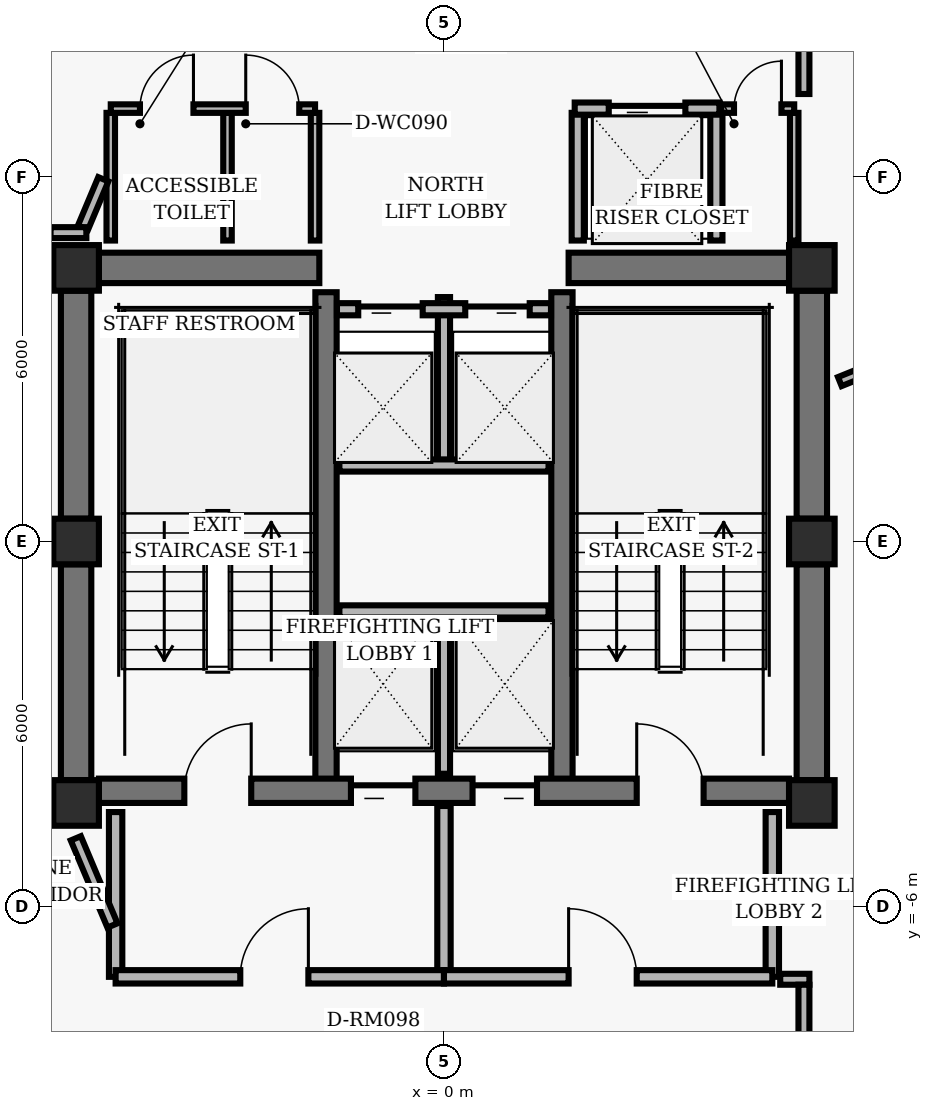
"""IFC4 building model, lengths in metres.
Left out: names, types, materials, properties, quantities, classifications, styles, units other than length and angle.
Written with IfcOpenShell. Run it as: python <this file> out.ifc"""

import sys

from ifc_helpers import new_model, si_unit, direction, frame, frame_2d, origin, origin_2d, place, context, subcontext, project, spatial, rectangle, hollow_rectangle, extrude, element, fill, save


model = new_model("IFC4")
c1 = context("Model", 3, precision=1e-05, world=origin(), true_north=direction((0.0, 1.0)))
c2 = subcontext(c1, "Body", "Model", "MODEL_VIEW")
j1 = project(units=[si_unit("LENGTHUNIT", "METRE"), si_unit("PLANEANGLEUNIT", "RADIAN")], contexts=[c1])
p1 = place(None, origin())
s1 = spatial("IfcSite", under=j1, at=p1, CompositionType="ELEMENT")
p2 = place(p1, origin())
s2 = spatial("IfcBuilding", under=s1, at=p2, CompositionType="ELEMENT")
p3 = place(p2, frame((0.0, 0.0, 190.56)))
s3 = spatial("IfcBuildingStorey", under=s2, at=p3, CompositionType="ELEMENT", Elevation=190.56)
for number, where, z_axis, x_axis in (
    (1, (-6.05, 4.5, 0.0), (0.0, 0.0, 1.0), (1.0, 0.0, 0.0)),
    (2, (6.05, 4.5, 0.0), (0.0, 0.0, 1.0), (1.0, 0.0, 0.0)),
    (3, (-6.05, 0.0, 0.0), (0.0, 0.0, 1.0), (1.0, 0.0, 0.0)),
    (4, (6.05, 0.0, 0.0), (0.0, 0.0, 1.0), (1.0, 0.0, 0.0)),
    (5, (-6.05, -4.3, 0.0), (0.0, 0.0, 1.0), (1.0, 0.0, 0.0)),
    (6, (6.05, -4.3, 0.0), (0.0, 0.0, 1.0), (1.0, 0.0, 0.0)),
):
    element("IfcColumn", number, at=place(p3, frame(where, z_axis=z_axis, x_axis=x_axis)), inside=s3, PredefinedType="COLUMN", context=c2, shape_type="SweptSolid", body=[
        extrude(hollow_rectangle(XDim=0.75, YDim=0.75, WallThickness=0.05, InnerFilletRadius=0.02, OuterFilletRadius=0.04, at=origin_2d()), origin(), (0.0, 0.0, 1.0), 3.04),
    ])
p4 = place(p3, frame((-6.05, 0.375, 0.0), z_axis=(0.0, 0.0, 1.0), x_axis=(0.0, 1.0, 0.0)))
e7 = element("IfcWall", 7, at=p4, inside=s3, PredefinedType="SHEAR", context=c2, shape_type="SweptSolid", body=[
    extrude(rectangle(XDim=3.75, YDim=0.5, at=frame_2d((1.875, 0.0))), origin(), (0.0, 0.0, 1.0), 2.618),
])
p5 = place(p3, frame((-6.05, -3.925, 0.0), z_axis=(0.0, 0.0, 1.0), x_axis=(0.0, 1.0, 0.0)))
e8 = element("IfcWall", 8, at=p5, inside=s3, PredefinedType="SHEAR", context=c2, shape_type="SweptSolid", body=[
    extrude(rectangle(XDim=3.55, YDim=0.5, at=frame_2d((1.775, 0.0))), origin(), (0.0, 0.0, 1.0), 2.618),
])
p6 = place(p3, frame((6.05, 0.375, 0.0), z_axis=(0.0, 0.0, 1.0), x_axis=(0.0, 1.0, 0.0)))
e9 = element("IfcWall", 9, at=p6, inside=s3, PredefinedType="SHEAR", context=c2, shape_type="SweptSolid", body=[
    extrude(rectangle(XDim=3.75, YDim=0.5, at=frame_2d((1.875, 0.0))), origin(), (0.0, 0.0, 1.0), 2.618),
])
p7 = place(p3, frame((6.05, -3.925, 0.0), z_axis=(0.0, 0.0, 1.0), x_axis=(0.0, 1.0, 0.0)))
e10 = element("IfcWall", 10, at=p7, inside=s3, PredefinedType="SHEAR", context=c2, shape_type="SweptSolid", body=[
    extrude(rectangle(XDim=3.55, YDim=0.5, at=frame_2d((1.775, 0.0))), origin(), (0.0, 0.0, 1.0), 2.618),
])
for number, where, z_axis, x_axis in (
    (11, (-1.94, -4.1, 0.0), (0.0, 0.0, 1.0), (0.0, 1.0, 0.0)),
    (12, (1.94, -4.1, 0.0), (0.0, 0.0, 1.0), (0.0, 1.0, 0.0)),
):
    element("IfcWall", number, at=place(p3, frame(where, z_axis=z_axis, x_axis=x_axis)), inside=s3, PredefinedType="SHEAR", context=c2, shape_type="SweptSolid", body=[
        extrude(rectangle(XDim=8.2, YDim=0.35, at=frame_2d((4.1, 0.0))), origin(), (0.0, 0.0, 1.0), 2.618),
    ])
p8 = place(p3, frame((-5.675, -4.1, 0.0), z_axis=(0.0, 0.0, 1.0), x_axis=(1.0, 0.0, 0.0)))
e13 = element("IfcWall", 13, at=p8, inside=s3, PredefinedType="SHEAR", context=c2, shape_type="SweptSolid", body=[
    extrude(rectangle(XDim=11.35, YDim=0.4, at=frame_2d((5.675, 0.0))), origin(), (0.0, 0.0, 1.0), 2.618),
])
p9 = place(p8, frame((1.405, 0.0, 0.0)))
e14 = element("IfcOpeningElement", 14, at=p9, cuts=e13, PredefinedType="OPENING", context=c2, shape_type="SweptSolid", body=[
    extrude(rectangle(XDim=1.1, YDim=2.04, at=frame_2d((0.55, 1.02))), frame((0.0, 0.21, 0.0), z_axis=(0.0, -1.0, 0.0), x_axis=(1.0, 0.0, 0.0)), (0.0, 0.0, 1.0), 0.42),
])
p10 = place(p8, frame((8.845, 0.0, 0.0)))
e15 = element("IfcOpeningElement", 15, at=p10, cuts=e13, PredefinedType="OPENING", context=c2, shape_type="SweptSolid", body=[
    extrude(rectangle(XDim=1.1, YDim=2.04, at=frame_2d((0.55, 1.02))), frame((0.0, 0.21, 0.0), z_axis=(0.0, -1.0, 0.0), x_axis=(1.0, 0.0, 0.0)), (0.0, 0.0, 1.0), 0.42),
])
p11 = place(p8, frame((4.145, 0.0, 0.0)))
e16 = element("IfcOpeningElement", 16, at=p11, cuts=e13, PredefinedType="OPENING", context=c2, shape_type="SweptSolid", body=[
    extrude(rectangle(XDim=1.06, YDim=2.04, at=frame_2d((0.53, 1.02))), frame((0.0, 0.21, 0.0), z_axis=(0.0, -1.0, 0.0), x_axis=(1.0, 0.0, 0.0)), (0.0, 0.0, 1.0), 0.42),
])
p12 = place(p8, frame((6.145, 0.0, 0.0)))
e17 = element("IfcOpeningElement", 17, at=p12, cuts=e13, PredefinedType="OPENING", context=c2, shape_type="SweptSolid", body=[
    extrude(rectangle(XDim=1.06, YDim=2.04, at=frame_2d((0.53, 1.02))), frame((0.0, 0.21, 0.0), z_axis=(0.0, -1.0, 0.0), x_axis=(1.0, 0.0, 0.0)), (0.0, 0.0, 1.0), 0.42),
])
for number, where, z_axis, x_axis in (
    (18, (-5.675, 4.5, 0.0), (0.0, 0.0, 1.0), (1.0, 0.0, 0.0)),
    (19, (2.05, 4.5, 0.0), (0.0, 0.0, 1.0), (1.0, 0.0, 0.0)),
):
    element("IfcWall", number, at=place(p3, frame(where, z_axis=z_axis, x_axis=x_axis)), inside=s3, PredefinedType="SHEAR", context=c2, shape_type="SweptSolid", body=[
        extrude(rectangle(XDim=3.625, YDim=0.5, at=frame_2d((1.812, 0.0))), origin(), (0.0, 0.0, 1.0), 2.618),
    ])
p13 = place(p3, frame((0.0, -3.82, 0.0), z_axis=(0.0, 0.0, 1.0), x_axis=(0.0, 1.0, 0.0)))
e20 = element("IfcWall", 20, at=p13, inside=s3, PredefinedType="PARTITIONING", context=c2, shape_type="SweptSolid", body=[
    extrude(rectangle(XDim=2.67, YDim=0.2, at=frame_2d((1.335, 0.0))), origin(), (0.0, 0.0, 1.0), 2.593),
])
p14 = place(p3, frame((-1.72, -1.15, 0.0), z_axis=(0.0, 0.0, 1.0), x_axis=(1.0, 0.0, 0.0)))
e21 = element("IfcWall", 21, at=p14, inside=s3, PredefinedType="PARTITIONING", context=c2, shape_type="SweptSolid", body=[
    extrude(rectangle(XDim=3.44, YDim=0.2, at=frame_2d((1.72, 0.0))), origin(), (0.0, 0.0, 1.0), 2.593),
])
for number, where, z_axis, x_axis in (
    (22, (-5.4, -7.16, 0.0), (0.0, 0.0, 1.0), (0.0, 1.0, 0.0)),
    (23, (5.4, -7.16, 0.0), (0.0, 0.0, 1.0), (0.0, 1.0, 0.0)),
):
    element("IfcWall", number, at=place(p3, frame(where, z_axis=z_axis, x_axis=x_axis)), inside=s3, PredefinedType="PARTITIONING", context=c2, shape_type="SweptSolid", body=[
        extrude(rectangle(XDim=2.71, YDim=0.22, at=frame_2d((1.355, 0.0))), origin(), (0.0, 0.0, 1.0), 2.593),
    ])
p15 = place(p3, frame((0.0, -7.16, 0.0), z_axis=(0.0, 0.0, 1.0), x_axis=(0.0, 1.0, 0.0)))
e24 = element("IfcWall", 24, at=p15, inside=s3, PredefinedType="PARTITIONING", context=c2, shape_type="SweptSolid", body=[
    extrude(rectangle(XDim=2.81, YDim=0.22, at=frame_2d((1.405, 0.0))), origin(), (0.0, 0.0, 1.0), 2.593),
])
p16 = place(p3, frame((-5.4, -7.16, 0.0), z_axis=(0.0, 0.0, 1.0), x_axis=(1.0, 0.0, 0.0)))
e25 = element("IfcWall", 25, at=p16, inside=s3, PredefinedType="PARTITIONING", context=c2, shape_type="SweptSolid", body=[
    extrude(rectangle(XDim=5.4, YDim=0.22, at=frame_2d((2.7, 0.0))), origin(), (0.0, 0.0, 1.0), 2.215),
])
p17 = place(p16, frame((2.05, 0.0, 0.0)))
e26 = element("IfcOpeningElement", 26, at=p17, cuts=e25, PredefinedType="OPENING", context=c2, shape_type="SweptSolid", body=[
    extrude(rectangle(XDim=1.12, YDim=2.02, at=frame_2d((0.56, 1.01))), frame((0.0, 0.12, 0.0), z_axis=(0.0, -1.0, 0.0), x_axis=(1.0, 0.0, 0.0)), (0.0, 0.0, 1.0), 0.24),
])
p18 = place(p3, frame((0.0, -7.16, 0.0), z_axis=(0.0, 0.0, 1.0), x_axis=(1.0, 0.0, 0.0)))
e27 = element("IfcWall", 27, at=p18, inside=s3, PredefinedType="PARTITIONING", context=c2, shape_type="SweptSolid", body=[
    extrude(rectangle(XDim=5.4, YDim=0.22, at=frame_2d((2.7, 0.0))), origin(), (0.0, 0.0, 1.0), 2.215),
])
p19 = place(p18, frame((2.05, 0.0, 0.0)))
e28 = element("IfcOpeningElement", 28, at=p19, cuts=e27, PredefinedType="OPENING", context=c2, shape_type="SweptSolid", body=[
    extrude(rectangle(XDim=1.12, YDim=2.02, at=frame_2d((0.56, 1.01))), frame((0.0, 0.12, 0.0), z_axis=(0.0, -1.0, 0.0), x_axis=(1.0, 0.0, 0.0)), (0.0, 0.0, 1.0), 0.24),
])
p20 = place(p3, frame((0.0, 1.25, 0.0), z_axis=(0.0, 0.0, 1.0), x_axis=(0.0, 1.0, 0.0)))
e29 = element("IfcWall", 29, at=p20, inside=s3, PredefinedType="PARTITIONING", context=c2, shape_type="SweptSolid", body=[
    extrude(rectangle(XDim=2.77, YDim=0.2, at=frame_2d((1.385, 0.0))), origin(), (0.0, 0.0, 1.0), 2.593),
])
p21 = place(p3, frame((-1.72, 1.25, 0.0), z_axis=(0.0, 0.0, 1.0), x_axis=(1.0, 0.0, 0.0)))
e30 = element("IfcWall", 30, at=p21, inside=s3, PredefinedType="PARTITIONING", context=c2, shape_type="SweptSolid", body=[
    extrude(rectangle(XDim=3.44, YDim=0.2, at=frame_2d((1.72, 0.0))), origin(), (0.0, 0.0, 1.0), 2.593),
])
p22 = place(p3, frame((-1.76, 3.82, 0.0), z_axis=(0.0, 0.0, 1.0), x_axis=(1.0, 0.0, 0.0)))
e31 = element("IfcWall", 31, at=p22, inside=s3, PredefinedType="PARTITIONING", context=c2, shape_type="SweptSolid", body=[
    extrude(rectangle(XDim=3.52, YDim=0.2, at=frame_2d((1.76, 0.0))), origin(), (0.0, 0.0, 1.0), 2.593),
])
p23 = place(p22, frame((0.35, 0.0, 0.0)))
e32 = element("IfcOpeningElement", 32, at=p23, cuts=e31, PredefinedType="OPENING", context=c2, shape_type="SweptSolid", body=[
    extrude(rectangle(XDim=1.06, YDim=2.04, at=frame_2d((0.53, 1.02))), frame((0.0, 0.11, 0.0), z_axis=(0.0, -1.0, 0.0), x_axis=(1.0, 0.0, 0.0)), (0.0, 0.0, 1.0), 0.22),
])
p24 = place(p22, frame((2.11, 0.0, 0.0)))
e33 = element("IfcOpeningElement", 33, at=p24, cuts=e31, PredefinedType="OPENING", context=c2, shape_type="SweptSolid", body=[
    extrude(rectangle(XDim=1.06, YDim=2.04, at=frame_2d((0.53, 1.02))), frame((0.0, 0.11, 0.0), z_axis=(0.0, -1.0, 0.0), x_axis=(1.0, 0.0, 0.0)), (0.0, 0.0, 1.0), 0.22),
])
for number, where, z_axis, x_axis in (
    (34, (2.2, 4.95, 0.0), (0.0, 0.0, 1.0), (0.0, 1.0, 0.0)),
    (35, (4.48, 4.95, 0.0), (0.0, 0.0, 1.0), (0.0, 1.0, 0.0)),
):
    element("IfcWall", number, at=place(p3, frame(where, z_axis=z_axis, x_axis=x_axis)), inside=s3, PredefinedType="PARTITIONING", context=c2, shape_type="SweptSolid", body=[
        extrude(rectangle(XDim=2.1, YDim=0.2, at=frame_2d((1.05, 0.0))), origin(), (0.0, 0.0, 1.0), 2.593),
    ])
p25 = place(p3, frame((2.15, 7.12, 0.0), z_axis=(0.0, 0.0, 1.0), x_axis=(1.0, 0.0, 0.0)))
e36 = element("IfcWall", 36, at=p25, inside=s3, PredefinedType="PARTITIONING", context=c2, shape_type="SweptSolid", body=[
    extrude(rectangle(XDim=2.38, YDim=0.2, at=frame_2d((1.19, 0.0))), origin(), (0.0, 0.0, 1.0), 2.593),
])
p26 = place(p25, frame((0.56, 0.0, 0.0)))
e37 = element("IfcOpeningElement", 37, at=p26, cuts=e36, PredefinedType="OPENING", context=c2, shape_type="SweptSolid", body=[
    extrude(rectangle(XDim=1.26, YDim=2.06, at=frame_2d((0.63, 1.03))), frame((0.0, 0.11, 0.0), z_axis=(0.0, -1.0, 0.0), x_axis=(1.0, 0.0, 0.0)), (0.0, 0.0, 1.0), 0.22),
])
for number, where, z_axis, x_axis in (
    (38, (-5.48, 4.95, 0.0), (0.0, 0.0, 1.0), (0.0, 1.0, 0.0)),
    (39, (-3.56, 4.95, 0.0), (0.0, 0.0, 1.0), (0.0, 1.0, 0.0)),
    (40, (-2.12, 4.95, 0.0), (0.0, 0.0, 1.0), (0.0, 1.0, 0.0)),
):
    element("IfcWall", number, at=place(p3, frame(where, z_axis=z_axis, x_axis=x_axis)), inside=s3, PredefinedType="PARTITIONING", context=c2, shape_type="SweptSolid", body=[
        extrude(rectangle(XDim=2.1, YDim=0.14, at=frame_2d((1.05, 0.0))), origin(), (0.0, 0.0, 1.0), 2.593),
    ])
p27 = place(p3, frame((-5.48, 7.12, 0.0), z_axis=(0.0, 0.0, 1.0), x_axis=(1.0, 0.0, 0.0)))
e41 = element("IfcWall", 41, at=p27, inside=s3, PredefinedType="PARTITIONING", context=c2, shape_type="SweptSolid", body=[
    extrude(rectangle(XDim=3.36, YDim=0.14, at=frame_2d((1.68, 0.0))), origin(), (0.0, 0.0, 1.0), 2.593),
])
p28 = place(p27, frame((0.48, 0.0, 0.0)))
e42 = element("IfcOpeningElement", 42, at=p28, cuts=e41, PredefinedType="OPENING", context=c2, shape_type="SweptSolid", body=[
    extrude(rectangle(XDim=0.88, YDim=2.02, at=frame_2d((0.44, 1.01))), frame((0.0, 0.08, 0.0), z_axis=(0.0, -1.0, 0.0), x_axis=(1.0, 0.0, 0.0)), (0.0, 0.0, 1.0), 0.16),
])
p29 = place(p27, frame((2.22, 0.0, 0.0)))
e43 = element("IfcOpeningElement", 43, at=p29, cuts=e41, PredefinedType="OPENING", context=c2, shape_type="SweptSolid", body=[
    extrude(rectangle(XDim=0.88, YDim=2.02, at=frame_2d((0.44, 1.01))), frame((0.0, 0.08, 0.0), z_axis=(0.0, -1.0, 0.0), x_axis=(1.0, 0.0, 0.0)), (0.0, 0.0, 1.0), 0.16),
])
p30 = place(p3, frame((5.76, 4.95, 0.0), z_axis=(0.0, 0.0, 1.0), x_axis=(0.0, 1.0, 0.0)))
e44 = element("IfcWall", 44, at=p30, inside=s3, PredefinedType="PARTITIONING", context=c2, shape_type="SweptSolid", body=[
    extrude(rectangle(XDim=2.1, YDim=0.14, at=frame_2d((1.05, 0.0))), origin(), (0.0, 0.0, 1.0), 2.073),
])
p31 = place(p3, frame((4.56, 7.12, 0.0), z_axis=(0.0, 0.0, 1.0), x_axis=(1.0, 0.0, 0.0)))
e45 = element("IfcWall", 45, at=p31, inside=s3, PredefinedType="PARTITIONING", context=c2, shape_type="SweptSolid", body=[
    extrude(rectangle(XDim=1.2, YDim=0.14, at=frame_2d((0.6, 0.0))), origin(), (0.0, 0.0, 1.0), 2.593),
])
p32 = place(p31, frame((0.21, 0.0, 0.0)))
e46 = element("IfcOpeningElement", 46, at=p32, cuts=e45, PredefinedType="OPENING", context=c2, shape_type="SweptSolid", body=[
    extrude(rectangle(XDim=0.78, YDim=2.01, at=frame_2d((0.39, 1.005))), frame((0.0, 0.08, 0.0), z_axis=(0.0, -1.0, 0.0), x_axis=(1.0, 0.0, 0.0)), (0.0, 0.0, 1.0), 0.16),
])
p33 = place(p3, frame((5.92, 9.16, 0.0), z_axis=(0.0, 0.0, 1.0), x_axis=(0.0, -1.0, 0.0)))
e47 = element("IfcWall", 47, at=p33, inside=s3, PredefinedType="PARTITIONING", context=c2, shape_type="SweptSolid", body=[
    extrude(rectangle(XDim=1.8, YDim=0.18, at=frame_2d((0.9, 0.0))), origin(), (0.0, 0.0, 1.0), 2.073),
])
p34 = place(p3, frame((-5.602, 5.958, 0.0), z_axis=(0.0, 0.0, 1.0), x_axis=(-0.387588639363, -0.921832439566, 0.0)))
e48 = element("IfcWall", 48, at=p34, inside=s3, PredefinedType="PARTITIONING", context=c2, shape_type="SweptSolid", body=[
    extrude(rectangle(XDim=0.862, YDim=0.18, at=frame_2d((0.431, 0.0))), origin(), (0.0, 0.0, 1.0), 2.593),
])
p35 = place(p3, frame((-5.881, 5.08, 0.0), z_axis=(0.0, 0.0, 1.0), x_axis=(-1.0, 0.0, 0.0)))
e49 = element("IfcWall", 49, at=p35, inside=s3, PredefinedType="PARTITIONING", context=c2, shape_type="SweptSolid", body=[
    extrude(rectangle(XDim=0.589, YDim=0.18, at=frame_2d((0.294, 0.0))), origin(), (0.0, 0.0, 1.0), 2.593),
])
p36 = place(p3, frame((-6.055, -4.882, 0.0), z_axis=(0.0, 0.0, 1.0), x_axis=(0.387579540458, -0.921836265189, 0.0)))
e50 = element("IfcWall", 50, at=p36, inside=s3, PredefinedType="PARTITIONING", context=c2, shape_type="SweptSolid", body=[
    extrude(rectangle(XDim=1.555, YDim=0.18, at=frame_2d((0.777, 0.0))), origin(), (0.0, 0.0, 1.0), 2.593),
])
p37 = place(p3, frame((5.53, -7.2, 0.0), z_axis=(0.0, 0.0, 1.0), x_axis=(1.0, 0.0, 0.0)))
e51 = element("IfcWall", 51, at=p37, inside=s3, PredefinedType="PARTITIONING", context=c2, shape_type="SweptSolid", body=[
    extrude(rectangle(XDim=0.48, YDim=0.18, at=frame_2d((0.24, 0.0))), origin(), (0.0, 0.0, 1.0), 2.593),
])
p38 = place(p3, frame((5.92, -7.29, 0.0), z_axis=(0.0, 0.0, 1.0), x_axis=(0.0, -1.0, 0.0)))
e52 = element("IfcWall", 52, at=p38, inside=s3, PredefinedType="PARTITIONING", context=c2, shape_type="SweptSolid", body=[
    extrude(rectangle(XDim=1.82, YDim=0.18, at=frame_2d((0.91, 0.0))), origin(), (0.0, 0.0, 1.0), 2.593),
])
p39 = place(p3, frame((6.51, 2.63, 0.0), z_axis=(0.0, 0.0, 1.0), x_axis=(0.927189354085, 0.374592981342, 0.0)))
e53 = element("IfcWall", 53, at=p39, inside=s3, PredefinedType="PARTITIONING", context=c2, shape_type="SweptSolid", body=[
    extrude(rectangle(XDim=5.872, YDim=0.16, at=frame_2d((2.936, 0.0))), origin(), (0.0, 0.0, 1.0), 2.593),
])
p40 = place(p9, origin())
e54 = element("IfcDoor", 54, at=p40, inside=s3, OperationType="SINGLE_SWING_RIGHT", PredefinedType="DOOR", context=c2, shape_type="SweptSolid", body=[
    extrude(rectangle(XDim=1.1, YDim=2.04, at=frame_2d((0.55, 1.02))), frame((0.0, 0.025, 0.0), z_axis=(0.0, -1.0, 0.0), x_axis=(1.0, 0.0, 0.0)), (0.0, 0.0, 1.0), 0.05),
])
fill(e14, e54)
p41 = place(p10, origin())
e55 = element("IfcDoor", 55, at=p41, inside=s3, OperationType="SINGLE_SWING_LEFT", PredefinedType="DOOR", context=c2, shape_type="SweptSolid", body=[
    extrude(rectangle(XDim=1.1, YDim=2.04, at=frame_2d((0.55, 1.02))), frame((0.0, 0.025, 0.0), z_axis=(0.0, -1.0, 0.0), x_axis=(1.0, 0.0, 0.0)), (0.0, 0.0, 1.0), 0.05),
])
fill(e15, e55)
p42 = place(p11, origin())
e56 = element("IfcDoor", 56, at=p42, inside=s3, OperationType="SLIDING_TO_LEFT", PredefinedType="DOOR", context=c2, shape_type="SweptSolid", body=[
    extrude(rectangle(XDim=1.06, YDim=2.04, at=frame_2d((0.53, 1.02))), frame((0.0, 0.025, 0.0), z_axis=(0.0, -1.0, 0.0), x_axis=(1.0, 0.0, 0.0)), (0.0, 0.0, 1.0), 0.05),
])
fill(e16, e56)
p43 = place(p12, origin())
e57 = element("IfcDoor", 57, at=p43, inside=s3, OperationType="SLIDING_TO_RIGHT", PredefinedType="DOOR", context=c2, shape_type="SweptSolid", body=[
    extrude(rectangle(XDim=1.06, YDim=2.04, at=frame_2d((0.53, 1.02))), frame((0.0, 0.025, 0.0), z_axis=(0.0, -1.0, 0.0), x_axis=(1.0, 0.0, 0.0)), (0.0, 0.0, 1.0), 0.05),
])
fill(e17, e57)
p44 = place(p17, origin())
e58 = element("IfcDoor", 58, at=p44, inside=s3, OperationType="SINGLE_SWING_RIGHT", PredefinedType="DOOR", context=c2, shape_type="SweptSolid", body=[
    extrude(rectangle(XDim=1.12, YDim=2.02, at=frame_2d((0.56, 1.01))), frame((0.0, 0.025, 0.0), z_axis=(0.0, -1.0, 0.0), x_axis=(1.0, 0.0, 0.0)), (0.0, 0.0, 1.0), 0.05),
])
fill(e26, e58)
p45 = place(p19, origin())
e59 = element("IfcDoor", 59, at=p45, inside=s3, OperationType="SINGLE_SWING_LEFT", PredefinedType="DOOR", context=c2, shape_type="SweptSolid", body=[
    extrude(rectangle(XDim=1.12, YDim=2.02, at=frame_2d((0.56, 1.01))), frame((0.0, 0.025, 0.0), z_axis=(0.0, -1.0, 0.0), x_axis=(1.0, 0.0, 0.0)), (0.0, 0.0, 1.0), 0.05),
])
fill(e28, e59)
p46 = place(p23, origin())
e60 = element("IfcDoor", 60, at=p46, inside=s3, OperationType="SLIDING_TO_LEFT", PredefinedType="DOOR", context=c2, shape_type="SweptSolid", body=[
    extrude(rectangle(XDim=1.06, YDim=2.04, at=frame_2d((0.53, 1.02))), frame((0.0, 0.025, 0.0), z_axis=(0.0, -1.0, 0.0), x_axis=(1.0, 0.0, 0.0)), (0.0, 0.0, 1.0), 0.05),
])
fill(e32, e60)
p47 = place(p24, origin())
e61 = element("IfcDoor", 61, at=p47, inside=s3, OperationType="SLIDING_TO_RIGHT", PredefinedType="DOOR", context=c2, shape_type="SweptSolid", body=[
    extrude(rectangle(XDim=1.06, YDim=2.04, at=frame_2d((0.53, 1.02))), frame((0.0, 0.025, 0.0), z_axis=(0.0, -1.0, 0.0), x_axis=(1.0, 0.0, 0.0)), (0.0, 0.0, 1.0), 0.05),
])
fill(e33, e61)
p48 = place(p26, origin())
e62 = element("IfcDoor", 62, at=p48, inside=s3, OperationType="SLIDING_TO_LEFT", PredefinedType="DOOR", context=c2, shape_type="SweptSolid", body=[
    extrude(rectangle(XDim=1.26, YDim=2.06, at=frame_2d((0.63, 1.03))), frame((0.0, 0.025, 0.0), z_axis=(0.0, -1.0, 0.0), x_axis=(1.0, 0.0, 0.0)), (0.0, 0.0, 1.0), 0.05),
])
fill(e37, e62)
p49 = place(p28, origin())
e63 = element("IfcDoor", 63, at=p49, inside=s3, OperationType="SINGLE_SWING_RIGHT", PredefinedType="DOOR", context=c2, shape_type="SweptSolid", body=[
    extrude(rectangle(XDim=0.88, YDim=2.02, at=frame_2d((0.44, 1.01))), frame((0.0, 0.025, 0.0), z_axis=(0.0, -1.0, 0.0), x_axis=(1.0, 0.0, 0.0)), (0.0, 0.0, 1.0), 0.05),
])
fill(e42, e63)
p50 = place(p29, origin())
e64 = element("IfcDoor", 64, at=p50, inside=s3, OperationType="SINGLE_SWING_LEFT", PredefinedType="DOOR", context=c2, shape_type="SweptSolid", body=[
    extrude(rectangle(XDim=0.88, YDim=2.02, at=frame_2d((0.44, 1.01))), frame((0.0, 0.025, 0.0), z_axis=(0.0, -1.0, 0.0), x_axis=(1.0, 0.0, 0.0)), (0.0, 0.0, 1.0), 0.05),
])
fill(e43, e64)
p51 = place(p32, origin())
e65 = element("IfcDoor", 65, at=p51, inside=s3, OperationType="SINGLE_SWING_RIGHT", PredefinedType="DOOR", context=c2, shape_type="SweptSolid", body=[
    extrude(rectangle(XDim=0.78, YDim=2.01, at=frame_2d((0.39, 1.005))), frame((0.0, 0.025, 0.0), z_axis=(0.0, -1.0, 0.0), x_axis=(1.0, 0.0, 0.0)), (0.0, 0.0, 1.0), 0.05),
])
fill(e46, e65)
save(model, sys.argv[1])
